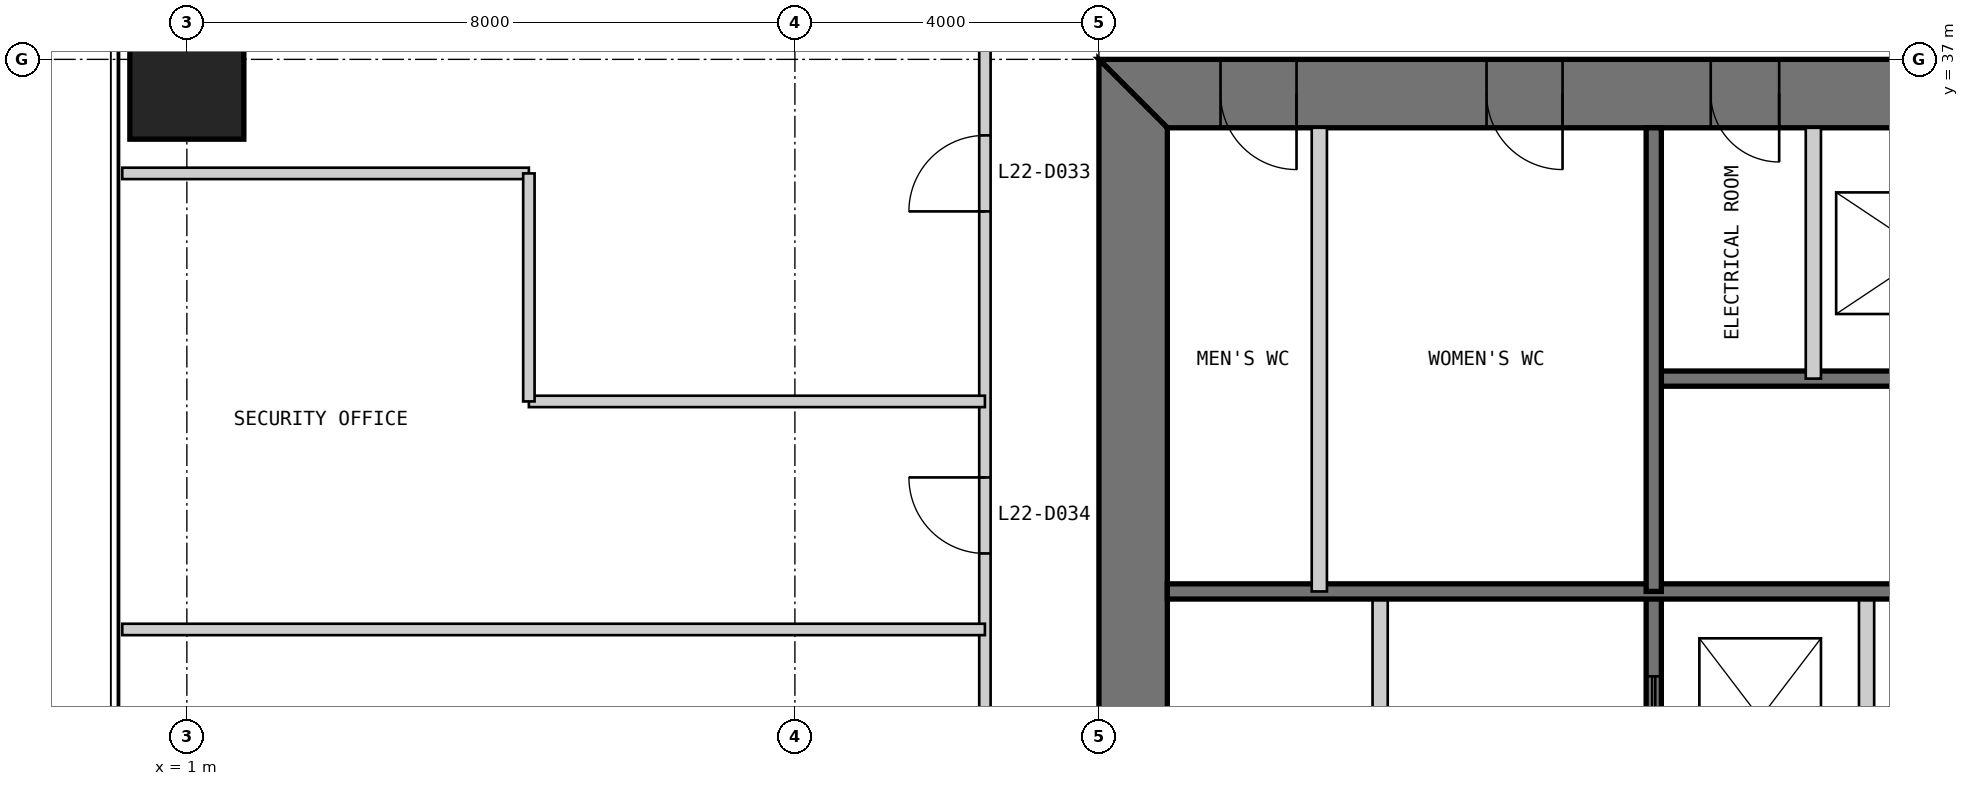
"""IFC4 building model, lengths in metres.
Left out: names, types, materials, properties, quantities, classifications, styles, units other than length and angle.
Written with IfcOpenShell. Run it as: python <this file> out.ifc"""

import sys

from ifc_helpers import new_model, si_unit, direction, frame, frame_2d, origin, origin_2d, place, context, subcontext, project, spatial, polyline, rectangle, outline, extrude, element, fill, save


model = new_model("IFC4")
c1 = context("Model", 3, precision=1e-05, world=origin(), true_north=direction((0.0, 1.0)))
c2 = subcontext(c1, "Body", "Model", "MODEL_VIEW")
j1 = project(units=[si_unit("LENGTHUNIT", "METRE"), si_unit("PLANEANGLEUNIT", "RADIAN")], contexts=[c1])
p1 = place(None, origin())
s1 = spatial("IfcSite", under=j1, at=p1, CompositionType="ELEMENT")
p2 = place(p1, origin())
s2 = spatial("IfcBuilding", under=s1, at=p2, CompositionType="ELEMENT")
p3 = place(p2, frame((0.0, 0.0, 97.0)))
s3 = spatial("IfcBuildingStorey", under=s2, at=p3, CompositionType="ELEMENT", Elevation=97.0)
p4 = place(p3, frame((1.0, 37.0, 0.0), z_axis=(0.0, 0.0, 1.0), x_axis=(1.0, 0.0, 0.0)))
e1 = element("IfcColumn", 1, at=p4, inside=s3, PredefinedType="COLUMN", context=c2, shape_type="SweptSolid", body=[
    extrude(rectangle(XDim=1.5, YDim=2.1, at=origin_2d()), origin(), (0.0, 0.0, 1.0), 5.4),
])
p5 = place(p3, frame((37.0, 36.55, 0.0), z_axis=(0.0, 0.0, 1.0), x_axis=(-1.0, 0.0, 0.0)))
e2 = element("IfcWall", 2, at=p5, inside=s3, PredefinedType="SHEAR", context=c2, shape_type="SweptSolid", body=[
    extrude(outline(polyline([(0.0, -0.45), (24.0, -0.45), (23.1, 0.45), (0.9, 0.45), (0.0, -0.45)])), origin(), (0.0, 0.0, 1.0), 5.4),
])
p6 = place(p5, frame((4.9, 0.0, 0.0)))
e3 = element("IfcOpeningElement", 3, at=p6, cuts=e2, PredefinedType="OPENING", context=c2, shape_type="SweptSolid", body=[
    extrude(rectangle(XDim=1.0, YDim=2.2, at=frame_2d((0.5, 1.1))), frame((0.0, 0.46, 0.0), z_axis=(0.0, -1.0, 0.0), x_axis=(1.0, 0.0, 0.0)), (0.0, 0.0, 1.0), 0.92),
])
p7 = place(p5, frame((8.9, 0.0, 0.0)))
e4 = element("IfcOpeningElement", 4, at=p7, cuts=e2, PredefinedType="OPENING", context=c2, shape_type="SweptSolid", body=[
    extrude(rectangle(XDim=1.1, YDim=2.2, at=frame_2d((0.55, 1.1))), frame((0.0, 0.46, 0.0), z_axis=(0.0, -1.0, 0.0), x_axis=(1.0, 0.0, 0.0)), (0.0, 0.0, 1.0), 0.92),
])
p8 = place(p5, frame((15.05, 0.0, 0.0)))
e5 = element("IfcOpeningElement", 5, at=p8, cuts=e2, PredefinedType="OPENING", context=c2, shape_type="SweptSolid", body=[
    extrude(rectangle(XDim=0.9, YDim=2.2, at=frame_2d((0.45, 1.1))), frame((0.0, 0.46, 0.0), z_axis=(0.0, -1.0, 0.0), x_axis=(1.0, 0.0, 0.0)), (0.0, 0.0, 1.0), 0.92),
])
p9 = place(p5, frame((17.9, 0.0, 0.0)))
e6 = element("IfcOpeningElement", 6, at=p9, cuts=e2, PredefinedType="OPENING", context=c2, shape_type="SweptSolid", body=[
    extrude(rectangle(XDim=1.0, YDim=2.2, at=frame_2d((0.5, 1.1))), frame((0.0, 0.46, 0.0), z_axis=(0.0, -1.0, 0.0), x_axis=(1.0, 0.0, 0.0)), (0.0, 0.0, 1.0), 0.92),
])
p10 = place(p5, frame((21.4, 0.0, 0.0)))
e7 = element("IfcOpeningElement", 7, at=p10, cuts=e2, PredefinedType="OPENING", context=c2, shape_type="SweptSolid", body=[
    extrude(rectangle(XDim=1.0, YDim=2.2, at=frame_2d((0.5, 1.1))), frame((0.0, 0.46, 0.0), z_axis=(0.0, -1.0, 0.0), x_axis=(1.0, 0.0, 0.0)), (0.0, 0.0, 1.0), 0.92),
])
p11 = place(p3, frame((13.45, 36.1, 0.0), z_axis=(0.0, 0.0, 1.0), x_axis=(0.0, -1.0, 0.0)))
e8 = element("IfcWall", 8, at=p11, inside=s3, PredefinedType="SHEAR", context=c2, shape_type="SweptSolid", body=[
    extrude(outline(polyline([(-0.9, -0.45), (23.1, -0.45), (22.2, 0.45), (0.0, 0.45), (-0.9, -0.45)])), origin(), (0.0, 0.0, 1.0), 5.4),
])
p12 = place(p11, frame((20.2, 0.0, 0.0)))
e9 = element("IfcOpeningElement", 9, at=p12, cuts=e8, PredefinedType="OPENING", context=c2, shape_type="SweptSolid", body=[
    extrude(rectangle(XDim=1.0, YDim=2.2, at=frame_2d((0.5, 1.1))), frame((0.0, 0.46, 0.0), z_axis=(0.0, -1.0, 0.0), x_axis=(1.0, 0.0, 0.0)), (0.0, 0.0, 1.0), 0.92),
])
p13 = place(p11, frame((17.25, 0.0, 0.0)))
e10 = element("IfcOpeningElement", 10, at=p13, cuts=e8, PredefinedType="OPENING", context=c2, shape_type="SweptSolid", body=[
    extrude(rectangle(XDim=0.9, YDim=2.2, at=frame_2d((0.45, 1.1))), frame((0.0, 0.46, 0.0), z_axis=(0.0, -1.0, 0.0), x_axis=(1.0, 0.0, 0.0)), (0.0, 0.0, 1.0), 0.92),
])
p14 = place(p3, frame((16.7, 13.9, 0.0), z_axis=(0.0, 0.0, 1.0), x_axis=(0.0, 1.0, 0.0)))
e11 = element("IfcWall", 11, at=p14, inside=s3, PredefinedType="PARTITIONING", context=c2, shape_type="SweptSolid", body=[
    extrude(rectangle(XDim=16.1, YDim=0.2, at=frame_2d((8.05, 0.0))), origin(), (0.0, 0.0, 1.0), 5.2),
])
p15 = place(p14, frame((8.15, 0.0, 0.0)))
e12 = element("IfcOpeningElement", 12, at=p15, cuts=e11, PredefinedType="OPENING", context=c2, shape_type="SweptSolid", body=[
    extrude(rectangle(XDim=0.9, YDim=2.2, at=frame_2d((0.45, 1.1))), frame((0.0, 0.11, 0.0), z_axis=(0.0, -1.0, 0.0), x_axis=(1.0, 0.0, 0.0)), (0.0, 0.0, 1.0), 0.22),
])
p16 = place(p14, frame((12.4, 0.0, 0.0)))
e13 = element("IfcOpeningElement", 13, at=p16, cuts=e11, PredefinedType="OPENING", context=c2, shape_type="SweptSolid", body=[
    extrude(rectangle(XDim=0.9, YDim=2.2, at=frame_2d((0.45, 1.1))), frame((0.0, 0.11, 0.0), z_axis=(0.0, -1.0, 0.0), x_axis=(1.0, 0.0, 0.0)), (0.0, 0.0, 1.0), 0.22),
])
p17 = place(p3, frame((20.3, 13.9, 0.0), z_axis=(0.0, 0.0, 1.0), x_axis=(0.0, 1.0, 0.0)))
e14 = element("IfcWall", 14, at=p17, inside=s3, PredefinedType="SOLIDWALL", context=c2, shape_type="SweptSolid", body=[
    extrude(rectangle(XDim=16.1, YDim=0.2, at=frame_2d((8.05, 0.0))), origin(), (0.0, 0.0, 1.0), 5.2),
])
p18 = place(p17, frame((7.217, 0.0, 0.0)))
e15 = element("IfcOpeningElement", 15, at=p18, cuts=e14, PredefinedType="OPENING", context=c2, shape_type="SweptSolid", body=[
    extrude(rectangle(XDim=1.1, YDim=2.2, at=frame_2d((0.55, 1.1))), frame((0.0, 0.11, 0.0), z_axis=(0.0, -1.0, 0.0), x_axis=(1.0, 0.0, 0.0)), (0.0, 0.0, 1.0), 0.22),
])
p19 = place(p17, frame((10.55, 0.0, 0.0)))
e16 = element("IfcOpeningElement", 16, at=p19, cuts=e14, PredefinedType="OPENING", context=c2, shape_type="SweptSolid", body=[
    extrude(rectangle(XDim=1.1, YDim=2.2, at=frame_2d((0.55, 1.1))), frame((0.0, 0.11, 0.0), z_axis=(0.0, -1.0, 0.0), x_axis=(1.0, 0.0, 0.0)), (0.0, 0.0, 1.0), 0.22),
])
p20 = place(p17, frame((13.883, 0.0, 0.0)))
e17 = element("IfcOpeningElement", 17, at=p20, cuts=e14, PredefinedType="OPENING", context=c2, shape_type="SweptSolid", body=[
    extrude(rectangle(XDim=1.1, YDim=2.2, at=frame_2d((0.55, 1.1))), frame((0.0, 0.11, 0.0), z_axis=(0.0, -1.0, 0.0), x_axis=(1.0, 0.0, 0.0)), (0.0, 0.0, 1.0), 0.22),
])
p21 = place(p3, frame((23.1, 20.0, 0.0), z_axis=(0.0, 0.0, 1.0), x_axis=(0.0, 1.0, 0.0)))
e18 = element("IfcWall", 18, at=p21, inside=s3, PredefinedType="PARTITIONING", context=c2, shape_type="SweptSolid", body=[
    extrude(rectangle(XDim=10.0, YDim=0.2, at=frame_2d((5.0, 0.0))), origin(), (0.0, 0.0, 1.0), 5.2),
])
p22 = place(p3, frame((29.7, 32.8, 0.0), z_axis=(0.0, 0.0, 1.0), x_axis=(-1.0, 0.0, 0.0)))
e19 = element("IfcWall", 19, at=p22, inside=s3, PredefinedType="SOLIDWALL", context=c2, shape_type="SweptSolid", body=[
    extrude(rectangle(XDim=9.4, YDim=0.2, at=frame_2d((4.7, 0.0))), origin(), (0.0, 0.0, 1.0), 5.2),
])
p23 = place(p22, frame((0.25, 0.0, 0.0)))
e20 = element("IfcOpeningElement", 20, at=p23, cuts=e19, PredefinedType="OPENING", context=c2, shape_type="SweptSolid", body=[
    extrude(rectangle(XDim=1.0, YDim=2.2, at=frame_2d((0.5, 1.1))), frame((0.0, 0.11, 0.0), z_axis=(0.0, -1.0, 0.0), x_axis=(1.0, 0.0, 0.0)), (0.0, 0.0, 1.0), 0.22),
])
p24 = place(p3, frame((29.7, 30.0, 0.0), z_axis=(0.0, 0.0, 1.0), x_axis=(-1.0, 0.0, 0.0)))
e21 = element("IfcWall", 21, at=p24, inside=s3, PredefinedType="SOLIDWALL", context=c2, shape_type="SweptSolid", body=[
    extrude(rectangle(XDim=15.8, YDim=0.2, at=frame_2d((7.9, 0.0))), origin(), (0.0, 0.0, 1.0), 5.2),
])
p25 = place(p3, frame((22.4, 36.1, 0.0), z_axis=(0.0, 0.0, 1.0), x_axis=(0.0, -1.0, 0.0)))
e22 = element("IfcWall", 22, at=p25, inside=s3, PredefinedType="PARTITIONING", context=c2, shape_type="SweptSolid", body=[
    extrude(rectangle(XDim=3.3, YDim=0.2, at=frame_2d((1.65, 0.0))), origin(), (0.0, 0.0, 1.0), 5.2),
])
p26 = place(p3, frame((20.3, 36.1, 0.0), z_axis=(0.0, 0.0, 1.0), x_axis=(0.0, -1.0, 0.0)))
e23 = element("IfcWall", 23, at=p26, inside=s3, PredefinedType="SOLIDWALL", context=c2, shape_type="SweptSolid", body=[
    extrude(rectangle(XDim=6.1, YDim=0.2, at=frame_2d((3.05, 0.0))), origin(), (0.0, 0.0, 1.0), 5.2),
])
p27 = place(p3, frame((15.9, 36.1, 0.0), z_axis=(0.0, 0.0, 1.0), x_axis=(0.0, -1.0, 0.0)))
e24 = element("IfcWall", 24, at=p27, inside=s3, PredefinedType="PARTITIONING", context=c2, shape_type="SweptSolid", body=[
    extrude(rectangle(XDim=6.1, YDim=0.2, at=frame_2d((3.05, 0.0))), origin(), (0.0, 0.0, 1.0), 5.2),
])
p28 = place(p3, frame((11.5, 38.5, 0.0), z_axis=(0.0, 0.0, 1.0), x_axis=(0.0, -1.0, 0.0)))
e25 = element("IfcWall", 25, at=p28, inside=s3, PredefinedType="PARTITIONING", context=c2, shape_type="SweptSolid", body=[
    extrude(rectangle(XDim=27.0, YDim=0.15, at=frame_2d((13.5, 0.0))), origin(), (0.0, 0.0, 1.0), 5.25),
])
p29 = place(p28, frame((2.5, 0.0, 0.0)))
e26 = element("IfcOpeningElement", 26, at=p29, cuts=e25, PredefinedType="OPENING", context=c2, shape_type="SweptSolid", body=[
    extrude(rectangle(XDim=1.0, YDim=2.2, at=frame_2d((0.5, 1.1))), frame((0.0, 0.085, 0.0), z_axis=(0.0, -1.0, 0.0), x_axis=(1.0, 0.0, 0.0)), (0.0, 0.0, 1.0), 0.17),
])
p30 = place(p28, frame((7.0, 0.0, 0.0)))
e27 = element("IfcOpeningElement", 27, at=p30, cuts=e25, PredefinedType="OPENING", context=c2, shape_type="SweptSolid", body=[
    extrude(rectangle(XDim=1.0, YDim=2.2, at=frame_2d((0.5, 1.1))), frame((0.0, 0.085, 0.0), z_axis=(0.0, -1.0, 0.0), x_axis=(1.0, 0.0, 0.0)), (0.0, 0.0, 1.0), 0.17),
])
p31 = place(p28, frame((14.5, 0.0, 0.0)))
e28 = element("IfcOpeningElement", 28, at=p31, cuts=e25, PredefinedType="OPENING", context=c2, shape_type="SweptSolid", body=[
    extrude(rectangle(XDim=1.0, YDim=2.2, at=frame_2d((0.5, 1.1))), frame((0.0, 0.085, 0.0), z_axis=(0.0, -1.0, 0.0), x_axis=(1.0, 0.0, 0.0)), (0.0, 0.0, 1.0), 0.17),
])
p32 = place(p3, frame((0.15, 35.5, 0.0), z_axis=(0.0, 0.0, 1.0), x_axis=(1.0, 0.0, 0.0)))
e29 = element("IfcWall", 29, at=p32, inside=s3, PredefinedType="PARTITIONING", context=c2, shape_type="SweptSolid", body=[
    extrude(rectangle(XDim=5.35, YDim=0.15, at=frame_2d((2.675, 0.0))), origin(), (0.0, 0.0, 1.0), 5.25),
])
p33 = place(p3, frame((5.5, 32.5, 0.0), z_axis=(0.0, 0.0, 1.0), x_axis=(1.0, 0.0, 0.0)))
e30 = element("IfcWall", 30, at=p33, inside=s3, PredefinedType="PARTITIONING", context=c2, shape_type="SweptSolid", body=[
    extrude(rectangle(XDim=6.0, YDim=0.15, at=frame_2d((3.0, 0.0))), origin(), (0.0, 0.0, 1.0), 5.25),
])
p34 = place(p3, frame((0.15, 29.5, 0.0), z_axis=(0.0, 0.0, 1.0), x_axis=(1.0, 0.0, 0.0)))
e31 = element("IfcWall", 31, at=p34, inside=s3, PredefinedType="PARTITIONING", context=c2, shape_type="SweptSolid", body=[
    extrude(rectangle(XDim=11.35, YDim=0.15, at=frame_2d((5.675, 0.0))), origin(), (0.0, 0.0, 1.0), 5.25),
])
p35 = place(p3, frame((5.5, 35.5, 0.0), z_axis=(0.0, 0.0, 1.0), x_axis=(0.0, -1.0, 0.0)))
e32 = element("IfcWall", 32, at=p35, inside=s3, PredefinedType="PARTITIONING", context=c2, shape_type="SweptSolid", body=[
    extrude(rectangle(XDim=3.0, YDim=0.15, at=frame_2d((1.5, 0.0))), origin(), (0.0, 0.0, 1.0), 5.25),
])
p36 = place(p8, origin())
e33 = element("IfcDoor", 33, at=p36, inside=s3, OperationType="SINGLE_SWING_LEFT", PredefinedType="DOOR", context=c2, shape_type="SweptSolid", body=[
    extrude(rectangle(XDim=0.9, YDim=2.2, at=frame_2d((0.45, 1.1))), frame((0.0, 0.025, 0.0), z_axis=(0.0, -1.0, 0.0), x_axis=(1.0, 0.0, 0.0)), (0.0, 0.0, 1.0), 0.05),
    extrude(outline(polyline([(0.0, 0.0), (0.04, 0.0), (0.04, 2.16), (0.86, 2.16), (0.86, 0.0), (0.9, 0.0), (0.9, 2.2), (0.0, 2.2), (0.0, 0.0)])), frame((0.0, 0.3, 0.0), z_axis=(0.0, -1.0, 0.0), x_axis=(1.0, 0.0, 0.0)), (0.0, 0.0, 1.0), 0.6),
])
fill(e5, e33)
p37 = place(p9, origin())
e34 = element("IfcDoor", 34, at=p37, inside=s3, OperationType="SINGLE_SWING_LEFT", PredefinedType="DOOR", context=c2, shape_type="SweptSolid", body=[
    extrude(rectangle(XDim=1.0, YDim=2.2, at=frame_2d((0.5, 1.1))), frame((0.0, 0.025, 0.0), z_axis=(0.0, -1.0, 0.0), x_axis=(1.0, 0.0, 0.0)), (0.0, 0.0, 1.0), 0.05),
    extrude(outline(polyline([(0.0, 0.0), (0.04, 0.0), (0.04, 2.16), (0.96, 2.16), (0.96, 0.0), (1.0, 0.0), (1.0, 2.2), (0.0, 2.2), (0.0, 0.0)])), frame((0.0, 0.3, 0.0), z_axis=(0.0, -1.0, 0.0), x_axis=(1.0, 0.0, 0.0)), (0.0, 0.0, 1.0), 0.6),
])
fill(e6, e34)
p38 = place(p10, origin())
e35 = element("IfcDoor", 35, at=p38, inside=s3, OperationType="SINGLE_SWING_LEFT", PredefinedType="DOOR", context=c2, shape_type="SweptSolid", body=[
    extrude(rectangle(XDim=1.0, YDim=2.2, at=frame_2d((0.5, 1.1))), frame((0.0, 0.025, 0.0), z_axis=(0.0, -1.0, 0.0), x_axis=(1.0, 0.0, 0.0)), (0.0, 0.0, 1.0), 0.05),
    extrude(outline(polyline([(0.0, 0.0), (0.04, 0.0), (0.04, 2.16), (0.96, 2.16), (0.96, 0.0), (1.0, 0.0), (1.0, 2.2), (0.0, 2.2), (0.0, 0.0)])), frame((0.0, 0.3, 0.0), z_axis=(0.0, -1.0, 0.0), x_axis=(1.0, 0.0, 0.0)), (0.0, 0.0, 1.0), 0.6),
])
fill(e7, e35)
p39 = place(p29, frame((1.0, 0.0, 0.0), z_axis=(0.0, 0.0, 1.0), x_axis=(-1.0, 0.0, 0.0)))
e36 = element("IfcDoor", 36, at=p39, inside=s3, OperationType="SINGLE_SWING_LEFT", PredefinedType="DOOR", context=c2, shape_type="SweptSolid", body=[
    extrude(rectangle(XDim=1.0, YDim=2.2, at=frame_2d((0.5, 1.1))), frame((0.0, 0.025, 0.0), z_axis=(0.0, -1.0, 0.0), x_axis=(1.0, 0.0, 0.0)), (0.0, 0.0, 1.0), 0.05),
])
fill(e26, e36)
p40 = place(p30, frame((1.0, 0.0, 0.0), z_axis=(0.0, 0.0, 1.0), x_axis=(-1.0, 0.0, 0.0)))
e37 = element("IfcDoor", 37, at=p40, inside=s3, OperationType="SINGLE_SWING_RIGHT", PredefinedType="DOOR", context=c2, shape_type="SweptSolid", body=[
    extrude(rectangle(XDim=1.0, YDim=2.2, at=frame_2d((0.5, 1.1))), frame((0.0, 0.025, 0.0), z_axis=(0.0, -1.0, 0.0), x_axis=(1.0, 0.0, 0.0)), (0.0, 0.0, 1.0), 0.05),
])
fill(e27, e37)
p41 = place(p20, origin())
e38 = element("IfcDoor", 38, at=p41, inside=s3, OperationType="DOUBLE_DOOR_SLIDING", PredefinedType="DOOR", context=c2, shape_type="SweptSolid", body=[
    extrude(rectangle(XDim=1.1, YDim=2.2, at=frame_2d((0.55, 1.1))), frame((0.0, 0.025, 0.0), z_axis=(0.0, -1.0, 0.0), x_axis=(1.0, 0.0, 0.0)), (0.0, 0.0, 1.0), 0.05),
])
fill(e17, e38)
save(model, sys.argv[1])
